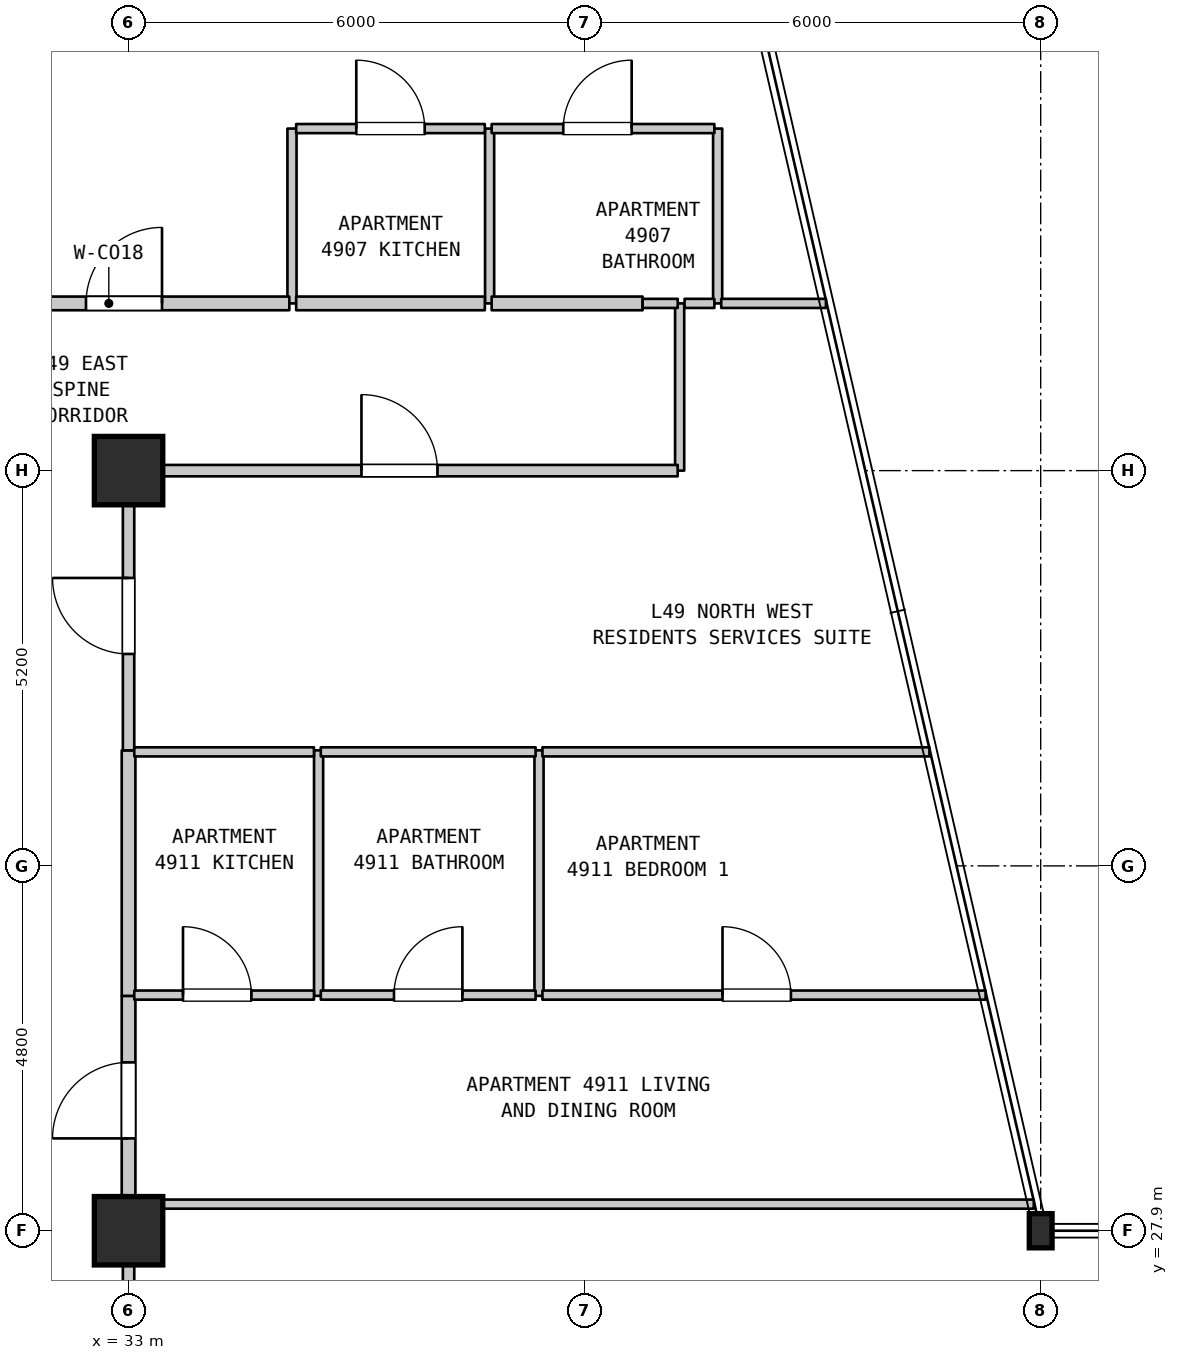
"""IFC4 building model, lengths in metres.
Left out: names, types, materials, properties, quantities, classifications, styles, units other than length and angle.
Written with IfcOpenShell. Run it as: python <this file> out.ifc"""

import sys

from ifc_helpers import new_model, si_unit, direction, frame, frame_2d, origin, origin_2d, place, context, subcontext, project, spatial, rectangle, i_section, extrude, element, fill, save


model = new_model("IFC4")
c1 = context("Model", 3, precision=1e-05, world=origin(), true_north=direction((0.0, 1.0)))
c2 = subcontext(c1, "Body", "Model", "MODEL_VIEW")
j1 = project(units=[si_unit("LENGTHUNIT", "METRE"), si_unit("PLANEANGLEUNIT", "RADIAN")], contexts=[c1])
p1 = place(None, origin())
s1 = spatial("IfcSite", under=j1, at=p1, CompositionType="ELEMENT")
p2 = place(p1, origin())
s2 = spatial("IfcBuilding", under=s1, at=p2, CompositionType="ELEMENT")
p3 = place(p2, frame((0.0, 0.0, 199.5)))
s3 = spatial("IfcBuildingStorey", under=s2, at=p3, CompositionType="ELEMENT", Elevation=199.5)
for number, where, z_axis, x_axis in (
    (1, (33.0, 27.9, 0.0), (0.0, 0.0, 1.0), (1.0, 0.0, 0.0)),
    (2, (33.0, 37.9, 0.0), (0.0, 0.0, 1.0), (1.0, 0.0, 0.0)),
):
    element("IfcColumn", number, at=place(p3, frame(where, z_axis=z_axis, x_axis=x_axis)), inside=s3, PredefinedType="COLUMN", context=c2, shape_type="SweptSolid", body=[
        extrude(rectangle(XDim=0.9, YDim=0.9, at=origin_2d()), origin(), (0.0, 0.0, 1.0), 3.7),
    ])
p4 = place(p3, frame((45.0, 27.9, 0.0), z_axis=(0.0, 0.0, 1.0), x_axis=(1.0, 0.0, 0.0)))
e3 = element("IfcColumn", 3, at=p4, inside=s3, PredefinedType="COLUMN", context=c2, shape_type="SweptSolid", body=[
    extrude(i_section(OverallWidth=0.3, OverallDepth=0.45, WebThickness=0.014, FlangeThickness=0.026, FilletRadius=0.027, at=origin_2d()), origin(), (0.0, 0.0, 1.0), 3.7),
])
p5 = place(p3, frame((33.0, 19.51, 0.0), z_axis=(0.0, 0.0, 1.0), x_axis=(0.0, 1.0, 0.0)))
e4 = element("IfcWall", 4, at=p5, inside=s3, PredefinedType="STANDARD", context=c2, shape_type="SweptSolid", body=[
    extrude(rectangle(XDim=8.72, YDim=0.15, at=frame_2d((4.36, 0.0))), origin(), (0.0, 0.0, 1.0), 2.99),
])
p6 = place(p5, frame((3.931, 0.0, 0.0)))
e5 = element("IfcOpeningElement", 5, at=p6, cuts=e4, PredefinedType="OPENING", context=c2, shape_type="SweptSolid", body=[
    extrude(rectangle(XDim=1.0, YDim=2.15, at=frame_2d((0.5, 1.075))), frame((0.0, 0.085, 0.0), z_axis=(0.0, -1.0, 0.0), x_axis=(1.0, 0.0, 0.0)), (0.0, 0.0, 1.0), 0.17),
])
p7 = place(p3, frame((33.0, 28.24, 0.0), z_axis=(0.0, 0.0, 1.0), x_axis=(0.0, 1.0, 0.0)))
e6 = element("IfcWall", 6, at=p7, inside=s3, PredefinedType="STANDARD", context=c2, shape_type="SweptSolid", body=[
    extrude(rectangle(XDim=2.75, YDim=0.18, at=frame_2d((1.375, 0.0))), origin(), (0.0, 0.0, 1.0), 2.89),
])
p8 = place(p7, frame((0.875, 0.0, 0.0)))
e7 = element("IfcOpeningElement", 7, at=p8, cuts=e6, PredefinedType="OPENING", context=c2, shape_type="SweptSolid", body=[
    extrude(rectangle(XDim=1.0, YDim=2.15, at=frame_2d((0.5, 1.075))), frame((0.0, 0.1, 0.0), z_axis=(0.0, -1.0, 0.0), x_axis=(1.0, 0.0, 0.0)), (0.0, 0.0, 1.0), 0.2),
])
p9 = place(p3, frame((33.0, 30.99, 0.0), z_axis=(0.0, 0.0, 1.0), x_axis=(0.0, 1.0, 0.0)))
e8 = element("IfcWall", 8, at=p9, inside=s3, PredefinedType="STANDARD", context=c2, shape_type="SweptSolid", body=[
    extrude(rectangle(XDim=3.23, YDim=0.18, at=frame_2d((1.615, 0.0))), origin(), (0.0, 0.0, 1.0), 2.89),
])
p10 = place(p3, frame((33.0, 34.22, 0.0), z_axis=(0.0, 0.0, 1.0), x_axis=(0.0, 1.0, 0.0)))
e9 = element("IfcWall", 9, at=p10, inside=s3, PredefinedType="STANDARD", context=c2, shape_type="SweptSolid", body=[
    extrude(rectangle(XDim=3.68, YDim=0.15, at=frame_2d((1.84, 0.0))), origin(), (0.0, 0.0, 1.0), 2.89),
])
p11 = place(p10, frame((1.268, 0.0, 0.0)))
e10 = element("IfcOpeningElement", 10, at=p11, cuts=e9, PredefinedType="OPENING", context=c2, shape_type="SweptSolid", body=[
    extrude(rectangle(XDim=1.0, YDim=2.15, at=frame_2d((0.5, 1.075))), frame((0.0, 0.085, 0.0), z_axis=(0.0, -1.0, 0.0), x_axis=(1.0, 0.0, 0.0)), (0.0, 0.0, 1.0), 0.17),
])
p12 = place(p3, frame((35.15, 40.1, 0.0), z_axis=(0.0, 0.0, 1.0), x_axis=(0.0, 1.0, 0.0)))
e11 = element("IfcWall", 11, at=p12, inside=s3, PredefinedType="PARTITIONING", context=c2, shape_type="SweptSolid", body=[
    extrude(rectangle(XDim=2.3, YDim=0.12, at=frame_2d((1.15, 0.0))), origin(), (0.0, 0.0, 1.0), 3.39),
])
p13 = place(p3, frame((35.5, 30.99, 0.0), z_axis=(0.0, 0.0, 1.0), x_axis=(0.0, 1.0, 0.0)))
e12 = element("IfcWall", 12, at=p13, inside=s3, PredefinedType="PARTITIONING", context=c2, shape_type="SweptSolid", body=[
    extrude(rectangle(XDim=3.23, YDim=0.12, at=frame_2d((1.615, 0.0))), origin(), (0.0, 0.0, 1.0), 3.39),
])
p14 = place(p3, frame((37.75, 40.1, 0.0), z_axis=(0.0, 0.0, 1.0), x_axis=(0.0, 1.0, 0.0)))
e13 = element("IfcWall", 13, at=p14, inside=s3, PredefinedType="PARTITIONING", context=c2, shape_type="SweptSolid", body=[
    extrude(rectangle(XDim=2.3, YDim=0.12, at=frame_2d((1.15, 0.0))), origin(), (0.0, 0.0, 1.0), 3.39),
])
p15 = place(p3, frame((38.4, 30.99, 0.0), z_axis=(0.0, 0.0, 1.0), x_axis=(0.0, 1.0, 0.0)))
e14 = element("IfcWall", 14, at=p15, inside=s3, PredefinedType="PARTITIONING", context=c2, shape_type="SweptSolid", body=[
    extrude(rectangle(XDim=3.23, YDim=0.12, at=frame_2d((1.615, 0.0))), origin(), (0.0, 0.0, 1.0), 3.39),
])
p16 = place(p3, frame((40.25, 37.9, 0.0), z_axis=(0.0, 0.0, 1.0), x_axis=(0.0, 1.0, 0.0)))
e15 = element("IfcWall", 15, at=p16, inside=s3, PredefinedType="PARTITIONING", context=c2, shape_type="SweptSolid", body=[
    extrude(rectangle(XDim=2.2, YDim=0.12, at=frame_2d((1.1, 0.0))), origin(), (0.0, 0.0, 1.0), 3.39),
])
p17 = place(p3, frame((40.75, 40.1, 0.0), z_axis=(0.0, 0.0, 1.0), x_axis=(0.0, 1.0, 0.0)))
e16 = element("IfcWall", 16, at=p17, inside=s3, PredefinedType="PARTITIONING", context=c2, shape_type="SweptSolid", body=[
    extrude(rectangle(XDim=2.3, YDim=0.12, at=frame_2d((1.15, 0.0))), origin(), (0.0, 0.0, 1.0), 3.39),
])
p18 = place(p3, frame((33.085, 28.25, 0.0), z_axis=(0.0, 0.0, 1.0), x_axis=(1.0, 0.0, 0.0)))
e17 = element("IfcWall", 17, at=p18, inside=s3, PredefinedType="PARTITIONING", context=c2, shape_type="SweptSolid", body=[
    extrude(rectangle(XDim=11.824, YDim=0.12, at=frame_2d((5.912, 0.0))), origin(), (0.0, 0.0, 1.0), 3.39),
])
p19 = place(p3, frame((33.075, 31.0, 0.0), z_axis=(0.0, 0.0, 1.0), x_axis=(1.0, 0.0, 0.0)))
e18 = element("IfcWall", 18, at=p19, inside=s3, PredefinedType="PARTITIONING", context=c2, shape_type="SweptSolid", body=[
    extrude(rectangle(XDim=2.364, YDim=0.12, at=frame_2d((1.182, 0.0))), origin(), (0.0, 0.0, 1.0), 3.39),
])
p20 = place(p19, frame((0.641, 0.0, 0.0)))
e19 = element("IfcOpeningElement", 19, at=p20, cuts=e18, PredefinedType="OPENING", context=c2, shape_type="SweptSolid", body=[
    extrude(rectangle(XDim=0.9, YDim=2.15, at=frame_2d((0.45, 1.075))), frame((0.0, 0.07, 0.0), z_axis=(0.0, -1.0, 0.0), x_axis=(1.0, 0.0, 0.0)), (0.0, 0.0, 1.0), 0.14),
])
p21 = place(p3, frame((35.529, 31.0, 0.0), z_axis=(0.0, 0.0, 1.0), x_axis=(1.0, 0.0, 0.0)))
e20 = element("IfcWall", 20, at=p21, inside=s3, PredefinedType="PARTITIONING", context=c2, shape_type="SweptSolid", body=[
    extrude(rectangle(XDim=2.826, YDim=0.12, at=frame_2d((1.413, 0.0))), origin(), (0.0, 0.0, 1.0), 3.39),
])
p22 = place(p21, frame((0.963, 0.0, 0.0)))
e21 = element("IfcOpeningElement", 21, at=p22, cuts=e20, PredefinedType="OPENING", context=c2, shape_type="SweptSolid", body=[
    extrude(rectangle(XDim=0.9, YDim=2.1, at=frame_2d((0.45, 1.05))), frame((0.0, 0.07, 0.0), z_axis=(0.0, -1.0, 0.0), x_axis=(1.0, 0.0, 0.0)), (0.0, 0.0, 1.0), 0.14),
])
p23 = place(p3, frame((38.445, 31.0, 0.0), z_axis=(0.0, 0.0, 1.0), x_axis=(1.0, 0.0, 0.0)))
e22 = element("IfcWall", 22, at=p23, inside=s3, PredefinedType="PARTITIONING", context=c2, shape_type="SweptSolid", body=[
    extrude(rectangle(XDim=5.83, YDim=0.12, at=frame_2d((2.915, 0.0))), origin(), (0.0, 0.0, 1.0), 3.39),
])
p24 = place(p23, frame((2.369, 0.0, 0.0)))
e23 = element("IfcOpeningElement", 23, at=p24, cuts=e22, PredefinedType="OPENING", context=c2, shape_type="SweptSolid", body=[
    extrude(rectangle(XDim=0.9, YDim=2.15, at=frame_2d((0.45, 1.075))), frame((0.0, 0.07, 0.0), z_axis=(0.0, -1.0, 0.0), x_axis=(1.0, 0.0, 0.0)), (0.0, 0.0, 1.0), 0.14),
])
p25 = place(p3, frame((33.075, 34.2, 0.0), z_axis=(0.0, 0.0, 1.0), x_axis=(1.0, 0.0, 0.0)))
e24 = element("IfcWall", 24, at=p25, inside=s3, PredefinedType="PARTITIONING", context=c2, shape_type="SweptSolid", body=[
    extrude(rectangle(XDim=2.364, YDim=0.12, at=frame_2d((1.182, 0.0))), origin(), (0.0, 0.0, 1.0), 3.39),
])
p26 = place(p3, frame((35.529, 34.2, 0.0), z_axis=(0.0, 0.0, 1.0), x_axis=(1.0, 0.0, 0.0)))
e25 = element("IfcWall", 25, at=p26, inside=s3, PredefinedType="PARTITIONING", context=c2, shape_type="SweptSolid", body=[
    extrude(rectangle(XDim=2.826, YDim=0.12, at=frame_2d((1.413, 0.0))), origin(), (0.0, 0.0, 1.0), 3.39),
])
p27 = place(p3, frame((38.445, 34.2, 0.0), z_axis=(0.0, 0.0, 1.0), x_axis=(1.0, 0.0, 0.0)))
e26 = element("IfcWall", 26, at=p27, inside=s3, PredefinedType="PARTITIONING", context=c2, shape_type="SweptSolid", body=[
    extrude(rectangle(XDim=5.091, YDim=0.12, at=frame_2d((2.545, 0.0))), origin(), (0.0, 0.0, 1.0), 3.39),
])
p28 = place(p3, frame((33.06, 37.9, 0.0), z_axis=(0.0, 0.0, 1.0), x_axis=(1.0, 0.0, 0.0)))
e27 = element("IfcWall", 27, at=p28, inside=s3, PredefinedType="STANDARD", context=c2, shape_type="SweptSolid", body=[
    extrude(rectangle(XDim=7.164, YDim=0.15, at=frame_2d((3.582, 0.0))), origin(), (0.0, 0.0, 1.0), 3.39),
])
p29 = place(p28, frame((3.004, 0.0, 0.0)))
e28 = element("IfcOpeningElement", 28, at=p29, cuts=e27, PredefinedType="OPENING", context=c2, shape_type="SweptSolid", body=[
    extrude(rectangle(XDim=1.0, YDim=2.15, at=frame_2d((0.5, 1.075))), frame((0.0, 0.085, 0.0), z_axis=(0.0, -1.0, 0.0), x_axis=(1.0, 0.0, 0.0)), (0.0, 0.0, 1.0), 0.17),
])
p30 = place(p3, frame((30.365, 40.1, 0.0), z_axis=(0.0, 0.0, 1.0), x_axis=(1.0, 0.0, 0.0)))
e29 = element("IfcWall", 29, at=p30, inside=s3, PredefinedType="STANDARD", context=c2, shape_type="SweptSolid", body=[
    extrude(rectangle(XDim=4.75, YDim=0.18, at=frame_2d((2.375, 0.0))), origin(), (0.0, 0.0, 1.0), 3.39),
])
p31 = place(p30, frame((2.075, 0.0, 0.0)))
e30 = element("IfcOpeningElement", 30, at=p31, cuts=e29, PredefinedType="OPENING", context=c2, shape_type="SweptSolid", body=[
    extrude(rectangle(XDim=1.0, YDim=2.15, at=frame_2d((0.5, 1.075))), frame((0.0, 0.1, 0.0), z_axis=(0.0, -1.0, 0.0), x_axis=(1.0, 0.0, 0.0)), (0.0, 0.0, 1.0), 0.2),
])
p32 = place(p3, frame((35.205, 40.1, 0.0), z_axis=(0.0, 0.0, 1.0), x_axis=(1.0, 0.0, 0.0)))
e31 = element("IfcWall", 31, at=p32, inside=s3, PredefinedType="STANDARD", context=c2, shape_type="SweptSolid", body=[
    extrude(rectangle(XDim=2.482, YDim=0.18, at=frame_2d((1.241, 0.0))), origin(), (0.0, 0.0, 1.0), 3.39),
])
p33 = place(p3, frame((37.777, 40.1, 0.0), z_axis=(0.0, 0.0, 1.0), x_axis=(1.0, 0.0, 0.0)))
e32 = element("IfcWall", 32, at=p33, inside=s3, PredefinedType="STANDARD", context=c2, shape_type="SweptSolid", body=[
    extrude(rectangle(XDim=1.986, YDim=0.18, at=frame_2d((0.993, 0.0))), origin(), (0.0, 0.0, 1.0), 3.39),
])
p34 = place(p3, frame((39.763, 40.1, 0.0), z_axis=(0.0, 0.0, 1.0), x_axis=(1.0, 0.0, 0.0)))
e33 = element("IfcWall", 33, at=p34, inside=s3, PredefinedType="PARTITIONING", context=c2, shape_type="SweptSolid", body=[
    extrude(rectangle(XDim=0.462, YDim=0.12, at=frame_2d((0.231, 0.0))), origin(), (0.0, 0.0, 1.0), 3.39),
])
p35 = place(p3, frame((40.315, 40.1, 0.0), z_axis=(0.0, 0.0, 1.0), x_axis=(1.0, 0.0, 0.0)))
e34 = element("IfcWall", 34, at=p35, inside=s3, PredefinedType="PARTITIONING", context=c2, shape_type="SweptSolid", body=[
    extrude(rectangle(XDim=0.392, YDim=0.12, at=frame_2d((0.196, 0.0))), origin(), (0.0, 0.0, 1.0), 3.39),
])
p36 = place(p3, frame((40.797, 40.1, 0.0), z_axis=(0.0, 0.0, 1.0), x_axis=(1.0, 0.0, 0.0)))
e35 = element("IfcWall", 35, at=p36, inside=s3, PredefinedType="PARTITIONING", context=c2, shape_type="SweptSolid", body=[
    extrude(rectangle(XDim=1.378, YDim=0.12, at=frame_2d((0.689, 0.0))), origin(), (0.0, 0.0, 1.0), 3.39),
])
p37 = place(p3, frame((35.205, 42.4, 0.0), z_axis=(0.0, 0.0, 1.0), x_axis=(1.0, 0.0, 0.0)))
e36 = element("IfcWall", 36, at=p37, inside=s3, PredefinedType="PARTITIONING", context=c2, shape_type="SweptSolid", body=[
    extrude(rectangle(XDim=2.482, YDim=0.12, at=frame_2d((1.241, 0.0))), origin(), (0.0, 0.0, 1.0), 3.39),
])
p38 = place(p37, frame((0.791, 0.0, 0.0)))
e37 = element("IfcOpeningElement", 37, at=p38, cuts=e36, PredefinedType="OPENING", context=c2, shape_type="SweptSolid", body=[
    extrude(rectangle(XDim=0.9, YDim=2.15, at=frame_2d((0.45, 1.075))), frame((0.0, 0.07, 0.0), z_axis=(0.0, -1.0, 0.0), x_axis=(1.0, 0.0, 0.0)), (0.0, 0.0, 1.0), 0.14),
])
p39 = place(p3, frame((37.777, 42.4, 0.0), z_axis=(0.0, 0.0, 1.0), x_axis=(1.0, 0.0, 0.0)))
e38 = element("IfcWall", 38, at=p39, inside=s3, PredefinedType="PARTITIONING", context=c2, shape_type="SweptSolid", body=[
    extrude(rectangle(XDim=2.93, YDim=0.12, at=frame_2d((1.465, 0.0))), origin(), (0.0, 0.0, 1.0), 3.39),
])
p40 = place(p39, frame((0.942, 0.0, 0.0)))
e39 = element("IfcOpeningElement", 39, at=p40, cuts=e38, PredefinedType="OPENING", context=c2, shape_type="SweptSolid", body=[
    extrude(rectangle(XDim=0.9, YDim=2.1, at=frame_2d((0.45, 1.05))), frame((0.0, 0.07, 0.0), z_axis=(0.0, -1.0, 0.0), x_axis=(1.0, 0.0, 0.0)), (0.0, 0.0, 1.0), 0.14),
])
p41 = place(p8, origin())
e40 = element("IfcDoor", 40, at=p41, inside=s3, OperationType="SINGLE_SWING_LEFT", PredefinedType="DOOR", context=c2, shape_type="SweptSolid", body=[
    extrude(rectangle(XDim=1.0, YDim=2.15, at=frame_2d((0.5, 1.075))), frame((0.0, 0.025, 0.0), z_axis=(0.0, -1.0, 0.0), x_axis=(1.0, 0.0, 0.0)), (0.0, 0.0, 1.0), 0.05),
])
fill(e7, e40)
p42 = place(p11, origin())
e41 = element("IfcDoor", 41, at=p42, inside=s3, OperationType="SINGLE_SWING_RIGHT", PredefinedType="DOOR", context=c2, shape_type="SweptSolid", body=[
    extrude(rectangle(XDim=1.0, YDim=2.15, at=frame_2d((0.5, 1.075))), frame((0.0, 0.025, 0.0), z_axis=(0.0, -1.0, 0.0), x_axis=(1.0, 0.0, 0.0)), (0.0, 0.0, 1.0), 0.05),
])
fill(e10, e41)
p43 = place(p20, origin())
e42 = element("IfcDoor", 42, at=p43, inside=s3, OperationType="SINGLE_SWING_LEFT", PredefinedType="DOOR", context=c2, shape_type="SweptSolid", body=[
    extrude(rectangle(XDim=0.9, YDim=2.15, at=frame_2d((0.45, 1.075))), frame((0.0, 0.025, 0.0), z_axis=(0.0, -1.0, 0.0), x_axis=(1.0, 0.0, 0.0)), (0.0, 0.0, 1.0), 0.05),
])
fill(e19, e42)
p44 = place(p22, origin())
e43 = element("IfcDoor", 43, at=p44, inside=s3, OperationType="SINGLE_SWING_RIGHT", PredefinedType="DOOR", context=c2, shape_type="SweptSolid", body=[
    extrude(rectangle(XDim=0.9, YDim=2.1, at=frame_2d((0.45, 1.05))), frame((0.0, 0.025, 0.0), z_axis=(0.0, -1.0, 0.0), x_axis=(1.0, 0.0, 0.0)), (0.0, 0.0, 1.0), 0.05),
])
fill(e21, e43)
p45 = place(p24, origin())
e44 = element("IfcDoor", 44, at=p45, inside=s3, OperationType="SINGLE_SWING_LEFT", PredefinedType="DOOR", context=c2, shape_type="SweptSolid", body=[
    extrude(rectangle(XDim=0.9, YDim=2.15, at=frame_2d((0.45, 1.075))), frame((0.0, 0.025, 0.0), z_axis=(0.0, -1.0, 0.0), x_axis=(1.0, 0.0, 0.0)), (0.0, 0.0, 1.0), 0.05),
])
fill(e23, e44)
p46 = place(p29, origin())
e45 = element("IfcDoor", 45, at=p46, inside=s3, OperationType="SINGLE_SWING_LEFT", PredefinedType="DOOR", context=c2, shape_type="SweptSolid", body=[
    extrude(rectangle(XDim=1.0, YDim=2.15, at=frame_2d((0.5, 1.075))), frame((0.0, 0.025, 0.0), z_axis=(0.0, -1.0, 0.0), x_axis=(1.0, 0.0, 0.0)), (0.0, 0.0, 1.0), 0.05),
])
fill(e28, e45)
p47 = place(p31, origin())
e46 = element("IfcDoor", 46, at=p47, inside=s3, OperationType="SINGLE_SWING_RIGHT", PredefinedType="DOOR", context=c2, shape_type="SweptSolid", body=[
    extrude(rectangle(XDim=1.0, YDim=2.15, at=frame_2d((0.5, 1.075))), frame((0.0, 0.025, 0.0), z_axis=(0.0, -1.0, 0.0), x_axis=(1.0, 0.0, 0.0)), (0.0, 0.0, 1.0), 0.05),
])
fill(e30, e46)
p48 = place(p38, origin())
e47 = element("IfcDoor", 47, at=p48, inside=s3, OperationType="SINGLE_SWING_LEFT", PredefinedType="DOOR", context=c2, shape_type="SweptSolid", body=[
    extrude(rectangle(XDim=0.9, YDim=2.15, at=frame_2d((0.45, 1.075))), frame((0.0, 0.025, 0.0), z_axis=(0.0, -1.0, 0.0), x_axis=(1.0, 0.0, 0.0)), (0.0, 0.0, 1.0), 0.05),
])
fill(e37, e47)
p49 = place(p40, origin())
e48 = element("IfcDoor", 48, at=p49, inside=s3, OperationType="SINGLE_SWING_RIGHT", PredefinedType="DOOR", context=c2, shape_type="SweptSolid", body=[
    extrude(rectangle(XDim=0.9, YDim=2.1, at=frame_2d((0.45, 1.05))), frame((0.0, 0.025, 0.0), z_axis=(0.0, -1.0, 0.0), x_axis=(1.0, 0.0, 0.0)), (0.0, 0.0, 1.0), 0.05),
])
fill(e39, e48)
save(model, sys.argv[1])
